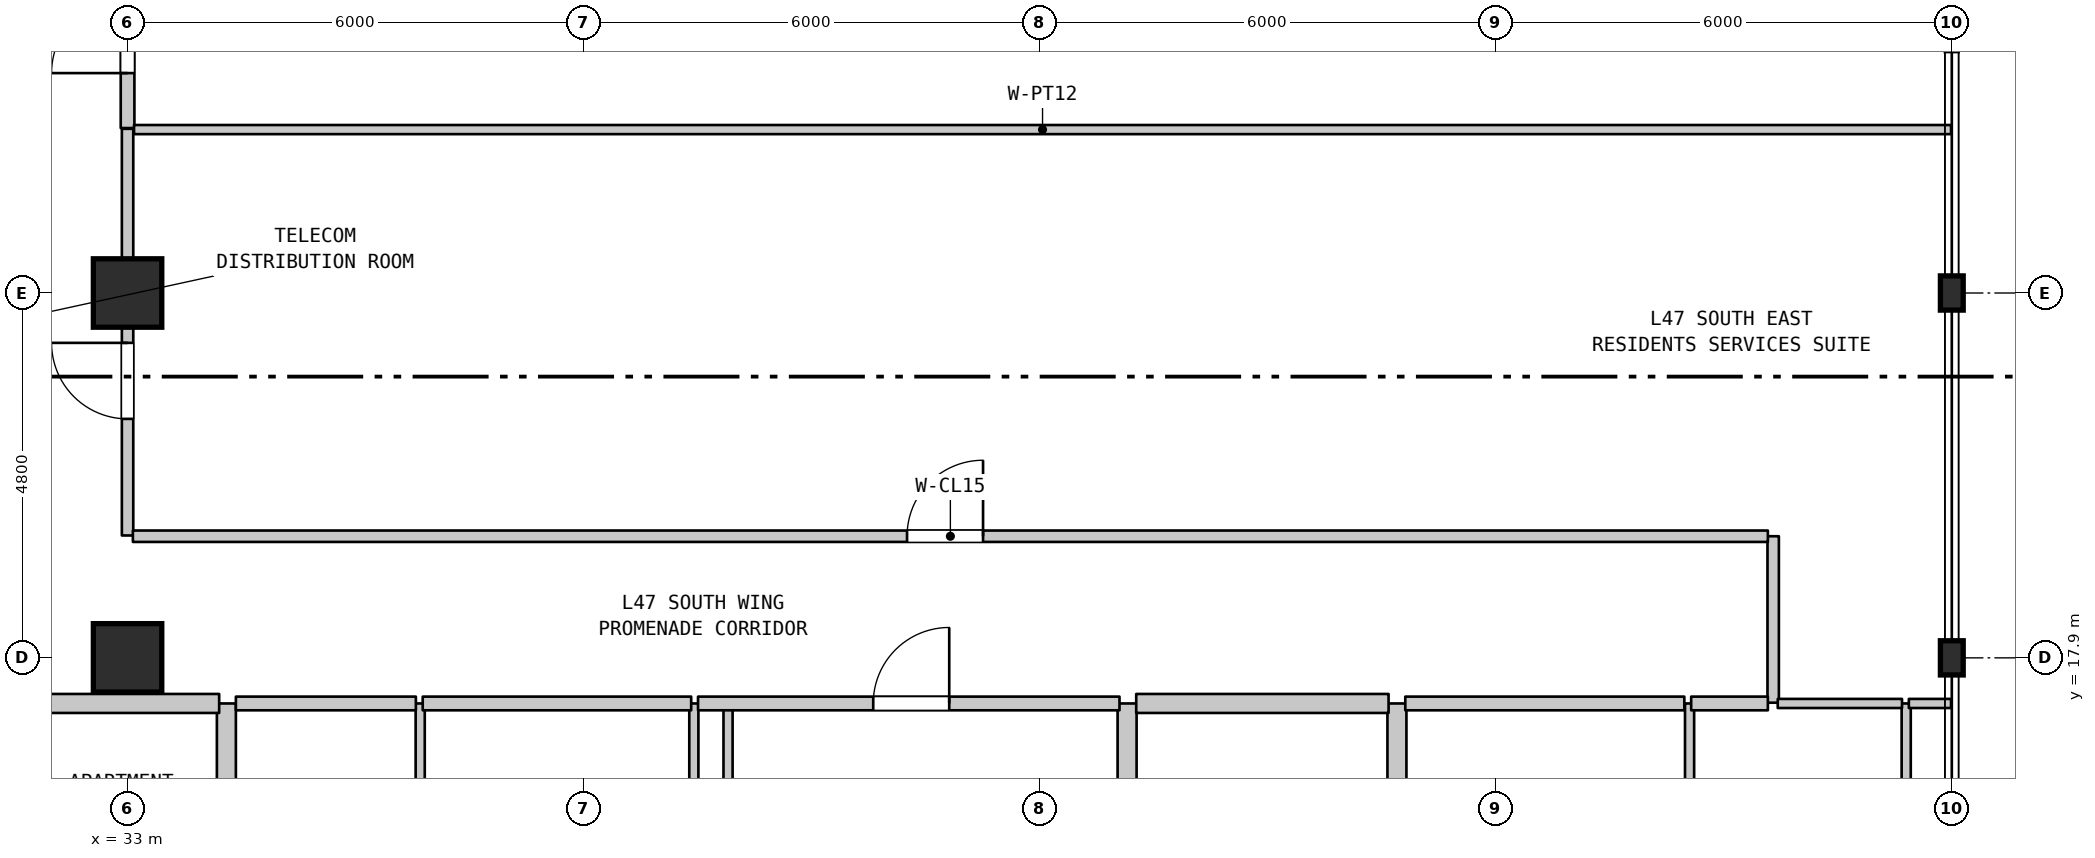
"""IFC4 building model, lengths in metres.
Left out: names, types, materials, properties, quantities, classifications, styles, units other than length and angle.
Written with IfcOpenShell. Run it as: python <this file> out.ifc"""

import sys

from ifc_helpers import new_model, si_unit, direction, frame, frame_2d, origin, origin_2d, place, context, subcontext, project, spatial, rectangle, i_section, extrude, element, fill, save


model = new_model("IFC4")
c1 = context("Model", 3, precision=1e-05, world=origin(), true_north=direction((0.0, 1.0)))
c2 = subcontext(c1, "Body", "Model", "MODEL_VIEW")
j1 = project(units=[si_unit("LENGTHUNIT", "METRE"), si_unit("PLANEANGLEUNIT", "RADIAN")], contexts=[c1])
p1 = place(None, origin())
s1 = spatial("IfcSite", under=j1, at=p1, CompositionType="ELEMENT")
p2 = place(p1, origin())
s2 = spatial("IfcBuilding", under=s1, at=p2, CompositionType="ELEMENT")
p3 = place(p2, frame((0.0, 0.0, 192.1)))
s3 = spatial("IfcBuildingStorey", under=s2, at=p3, CompositionType="ELEMENT", Elevation=192.1)
for number, where, z_axis, x_axis in (
    (1, (33.0, 17.9, 0.0), (0.0, 0.0, 1.0), (1.0, 0.0, 0.0)),
    (2, (33.0, 22.7, 0.0), (0.0, 0.0, 1.0), (1.0, 0.0, 0.0)),
):
    element("IfcColumn", number, at=place(p3, frame(where, z_axis=z_axis, x_axis=x_axis)), inside=s3, PredefinedType="COLUMN", context=c2, shape_type="SweptSolid", body=[
        extrude(rectangle(XDim=0.9, YDim=0.9, at=origin_2d()), origin(), (0.0, 0.0, 1.0), 3.7),
    ])
for number, where, z_axis, x_axis in (
    (3, (57.0, 17.9, 0.0), (0.0, 0.0, 1.0), (1.0, 0.0, 0.0)),
    (4, (57.0, 22.7, 0.0), (0.0, 0.0, 1.0), (1.0, 0.0, 0.0)),
):
    element("IfcColumn", number, at=place(p3, frame(where, z_axis=z_axis, x_axis=x_axis)), inside=s3, PredefinedType="COLUMN", context=c2, shape_type="SweptSolid", body=[
        extrude(i_section(OverallWidth=0.3, OverallDepth=0.45, WebThickness=0.014, FlangeThickness=0.026, FilletRadius=0.027, at=origin_2d()), origin(), (0.0, 0.0, 1.0), 3.7),
    ])
p4 = place(p3, frame((33.0, 19.51, 0.0), z_axis=(0.0, 0.0, 1.0), x_axis=(0.0, 1.0, 0.0)))
e5 = element("IfcWall", 5, at=p4, inside=s3, PredefinedType="STANDARD", context=c2, shape_type="SweptSolid", body=[
    extrude(rectangle(XDim=5.35, YDim=0.15, at=frame_2d((2.675, 0.0))), origin(), (0.0, 0.0, 1.0), 2.99),
])
p5 = place(p4, frame((1.534, 0.0, 0.0)))
e6 = element("IfcOpeningElement", 6, at=p5, cuts=e5, PredefinedType="OPENING", context=c2, shape_type="SweptSolid", body=[
    extrude(rectangle(XDim=1.0, YDim=2.15, at=frame_2d((0.5, 1.075))), frame((0.0, 0.085, 0.0), z_axis=(0.0, -1.0, 0.0), x_axis=(1.0, 0.0, 0.0)), (0.0, 0.0, 1.0), 0.17),
])
p6 = place(p3, frame((33.0, 24.87, 0.0), z_axis=(0.0, 0.0, 1.0), x_axis=(0.0, 1.0, 0.0)))
e7 = element("IfcWall", 7, at=p6, inside=s3, PredefinedType="STANDARD", context=c2, shape_type="SweptSolid", body=[
    extrude(rectangle(XDim=2.6, YDim=0.18, at=frame_2d((1.3, 0.0))), origin(), (0.0, 0.0, 1.0), 2.99),
])
p7 = place(p6, frame((0.723, 0.0, 0.0)))
e8 = element("IfcOpeningElement", 8, at=p7, cuts=e7, PredefinedType="OPENING", context=c2, shape_type="SweptSolid", body=[
    extrude(rectangle(XDim=1.0, YDim=2.15, at=frame_2d((0.5, 1.075))), frame((0.0, 0.1, 0.0), z_axis=(0.0, -1.0, 0.0), x_axis=(1.0, 0.0, 0.0)), (0.0, 0.0, 1.0), 0.2),
])
p8 = place(p3, frame((34.3, 11.15, 0.0), z_axis=(0.0, 0.0, 1.0), x_axis=(0.0, 1.0, 0.0)))
e9 = element("IfcWall", 9, at=p8, inside=s3, PredefinedType="STANDARD", context=c2, shape_type="SweptSolid", body=[
    extrude(rectangle(XDim=6.15, YDim=0.25, at=frame_2d((3.075, 0.0))), origin(), (0.0, 0.0, 1.0), 3.39),
])
for number, where, z_axis, x_axis in (
    (10, (36.85, 11.15, 0.0), (0.0, 0.0, 1.0), (0.0, 1.0, 0.0)),
    (11, (40.45, 11.15, 0.0), (0.0, 0.0, 1.0), (0.0, 1.0, 0.0)),
):
    element("IfcWall", number, at=place(p3, frame(where, z_axis=z_axis, x_axis=x_axis)), inside=s3, PredefinedType="PARTITIONING", context=c2, shape_type="SweptSolid", body=[
        extrude(rectangle(XDim=6.15, YDim=0.12, at=frame_2d((3.075, 0.0))), origin(), (0.0, 0.0, 1.0), 3.39),
    ])
p9 = place(p3, frame((40.9, 14.85, 0.0), z_axis=(0.0, 0.0, 1.0), x_axis=(0.0, 1.0, 0.0)))
e12 = element("IfcWall", 12, at=p9, inside=s3, PredefinedType="PARTITIONING", context=c2, shape_type="SweptSolid", body=[
    extrude(rectangle(XDim=2.45, YDim=0.12, at=frame_2d((1.225, 0.0))), origin(), (0.0, 0.0, 1.0), 3.39),
])
for number, where, z_axis, x_axis in (
    (13, (46.15, 11.15, 0.0), (0.0, 0.0, 1.0), (0.0, 1.0, 0.0)),
    (14, (49.7, 11.15, 0.0), (0.0, 0.0, 1.0), (0.0, 1.0, 0.0)),
):
    element("IfcWall", number, at=place(p3, frame(where, z_axis=z_axis, x_axis=x_axis)), inside=s3, PredefinedType="STANDARD", context=c2, shape_type="SweptSolid", body=[
        extrude(rectangle(XDim=6.15, YDim=0.25, at=frame_2d((3.075, 0.0))), origin(), (0.0, 0.0, 1.0), 3.39),
    ])
p10 = place(p3, frame((53.55, 11.15, 0.0), z_axis=(0.0, 0.0, 1.0), x_axis=(0.0, 1.0, 0.0)))
e15 = element("IfcWall", 15, at=p10, inside=s3, PredefinedType="PARTITIONING", context=c2, shape_type="SweptSolid", body=[
    extrude(rectangle(XDim=6.15, YDim=0.12, at=frame_2d((3.075, 0.0))), origin(), (0.0, 0.0, 1.0), 3.39),
])
p11 = place(p3, frame((54.65, 17.31, 0.0), z_axis=(0.0, 0.0, 1.0), x_axis=(0.0, 1.0, 0.0)))
e16 = element("IfcWall", 16, at=p11, inside=s3, PredefinedType="STANDARD", context=c2, shape_type="SweptSolid", body=[
    extrude(rectangle(XDim=2.19, YDim=0.15, at=frame_2d((1.095, 0.0))), origin(), (0.0, 0.0, 1.0), 3.39),
])
p12 = place(p3, frame((56.4, 11.15, 0.0), z_axis=(0.0, 0.0, 1.0), x_axis=(0.0, 1.0, 0.0)))
e17 = element("IfcWall", 17, at=p12, inside=s3, PredefinedType="PARTITIONING", context=c2, shape_type="SweptSolid", body=[
    extrude(rectangle(XDim=6.15, YDim=0.12, at=frame_2d((3.075, 0.0))), origin(), (0.0, 0.0, 1.0), 3.39),
])
p13 = place(p3, frame((31.56, 17.3, 0.0), z_axis=(0.0, 0.0, 1.0), x_axis=(1.0, 0.0, 0.0)))
e18 = element("IfcWall", 18, at=p13, inside=s3, PredefinedType="STANDARD", context=c2, shape_type="SweptSolid", body=[
    extrude(rectangle(XDim=2.645, YDim=0.25, at=frame_2d((1.323, 0.0))), origin(), (0.0, 0.0, 1.0), 3.39),
])
p14 = place(p3, frame((34.425, 17.3, 0.0), z_axis=(0.0, 0.0, 1.0), x_axis=(1.0, 0.0, 0.0)))
e19 = element("IfcWall", 19, at=p14, inside=s3, PredefinedType="STANDARD", context=c2, shape_type="SweptSolid", body=[
    extrude(rectangle(XDim=2.368, YDim=0.18, at=frame_2d((1.184, 0.0))), origin(), (0.0, 0.0, 1.0), 3.39),
])
p15 = place(p3, frame((36.883, 17.3, 0.0), z_axis=(0.0, 0.0, 1.0), x_axis=(1.0, 0.0, 0.0)))
e20 = element("IfcWall", 20, at=p15, inside=s3, PredefinedType="STANDARD", context=c2, shape_type="SweptSolid", body=[
    extrude(rectangle(XDim=3.532, YDim=0.18, at=frame_2d((1.766, 0.0))), origin(), (0.0, 0.0, 1.0), 3.39),
])
p16 = place(p3, frame((40.505, 17.3, 0.0), z_axis=(0.0, 0.0, 1.0), x_axis=(1.0, 0.0, 0.0)))
e21 = element("IfcWall", 21, at=p16, inside=s3, PredefinedType="STANDARD", context=c2, shape_type="SweptSolid", body=[
    extrude(rectangle(XDim=5.545, YDim=0.18, at=frame_2d((2.772, 0.0))), origin(), (0.0, 0.0, 1.0), 3.39),
])
p17 = place(p16, frame((2.305, 0.0, 0.0)))
e22 = element("IfcOpeningElement", 22, at=p17, cuts=e21, PredefinedType="OPENING", context=c2, shape_type="SweptSolid", body=[
    extrude(rectangle(XDim=1.0, YDim=2.15, at=frame_2d((0.5, 1.075))), frame((0.0, 0.1, 0.0), z_axis=(0.0, -1.0, 0.0), x_axis=(1.0, 0.0, 0.0)), (0.0, 0.0, 1.0), 0.2),
])
p18 = place(p3, frame((46.27, 17.3, 0.0), z_axis=(0.0, 0.0, 1.0), x_axis=(1.0, 0.0, 0.0)))
e23 = element("IfcWall", 23, at=p18, inside=s3, PredefinedType="STANDARD", context=c2, shape_type="SweptSolid", body=[
    extrude(rectangle(XDim=3.32, YDim=0.25, at=frame_2d((1.66, 0.0))), origin(), (0.0, 0.0, 1.0), 3.39),
])
p19 = place(p3, frame((49.81, 17.3, 0.0), z_axis=(0.0, 0.0, 1.0), x_axis=(1.0, 0.0, 0.0)))
e24 = element("IfcWall", 24, at=p19, inside=s3, PredefinedType="STANDARD", context=c2, shape_type="SweptSolid", body=[
    extrude(rectangle(XDim=3.671, YDim=0.18, at=frame_2d((1.835, 0.0))), origin(), (0.0, 0.0, 1.0), 3.39),
])
p20 = place(p3, frame((53.571, 17.3, 0.0), z_axis=(0.0, 0.0, 1.0), x_axis=(1.0, 0.0, 0.0)))
e25 = element("IfcWall", 25, at=p20, inside=s3, PredefinedType="STANDARD", context=c2, shape_type="SweptSolid", body=[
    extrude(rectangle(XDim=1.009, YDim=0.18, at=frame_2d((0.504, 0.0))), origin(), (0.0, 0.0, 1.0), 3.39),
])
p21 = place(p3, frame((54.71, 17.3, 0.0), z_axis=(0.0, 0.0, 1.0), x_axis=(1.0, 0.0, 0.0)))
e26 = element("IfcWall", 26, at=p21, inside=s3, PredefinedType="PARTITIONING", context=c2, shape_type="SweptSolid", body=[
    extrude(rectangle(XDim=1.635, YDim=0.12, at=frame_2d((0.817, 0.0))), origin(), (0.0, 0.0, 1.0), 3.39),
])
p22 = place(p3, frame((56.435, 17.3, 0.0), z_axis=(0.0, 0.0, 1.0), x_axis=(1.0, 0.0, 0.0)))
e27 = element("IfcWall", 27, at=p22, inside=s3, PredefinedType="PARTITIONING", context=c2, shape_type="SweptSolid", body=[
    extrude(rectangle(XDim=0.555, YDim=0.12, at=frame_2d((0.277, 0.0))), origin(), (0.0, 0.0, 1.0), 3.39),
])
p23 = place(p3, frame((33.07, 19.5, 0.0), z_axis=(0.0, 0.0, 1.0), x_axis=(1.0, 0.0, 0.0)))
e28 = element("IfcWall", 28, at=p23, inside=s3, PredefinedType="STANDARD", context=c2, shape_type="SweptSolid", body=[
    extrude(rectangle(XDim=21.51, YDim=0.15, at=frame_2d((10.755, 0.0))), origin(), (0.0, 0.0, 1.0), 3.39),
])
p24 = place(p23, frame((10.185, 0.0, 0.0)))
e29 = element("IfcOpeningElement", 29, at=p24, cuts=e28, PredefinedType="OPENING", context=c2, shape_type="SweptSolid", body=[
    extrude(rectangle(XDim=1.0, YDim=2.15, at=frame_2d((0.5, 1.075))), frame((0.0, 0.085, 0.0), z_axis=(0.0, -1.0, 0.0), x_axis=(1.0, 0.0, 0.0)), (0.0, 0.0, 1.0), 0.17),
])
p25 = place(p3, frame((33.085, 24.85, 0.0), z_axis=(0.0, 0.0, 1.0), x_axis=(1.0, 0.0, 0.0)))
e30 = element("IfcWall", 30, at=p25, inside=s3, PredefinedType="PARTITIONING", context=c2, shape_type="SweptSolid", body=[
    extrude(rectangle(XDim=23.905, YDim=0.12, at=frame_2d((11.953, 0.0))), origin(), (0.0, 0.0, 1.0), 3.39),
])
p26 = place(p5, origin())
e31 = element("IfcDoor", 31, at=p26, inside=s3, OperationType="SINGLE_SWING_RIGHT", PredefinedType="DOOR", context=c2, shape_type="SweptSolid", body=[
    extrude(rectangle(XDim=1.0, YDim=2.15, at=frame_2d((0.5, 1.075))), frame((0.0, 0.025, 0.0), z_axis=(0.0, -1.0, 0.0), x_axis=(1.0, 0.0, 0.0)), (0.0, 0.0, 1.0), 0.05),
])
fill(e6, e31)
p27 = place(p7, origin())
e32 = element("IfcDoor", 32, at=p27, inside=s3, OperationType="SINGLE_SWING_LEFT", PredefinedType="DOOR", context=c2, shape_type="SweptSolid", body=[
    extrude(rectangle(XDim=1.0, YDim=2.15, at=frame_2d((0.5, 1.075))), frame((0.0, 0.025, 0.0), z_axis=(0.0, -1.0, 0.0), x_axis=(1.0, 0.0, 0.0)), (0.0, 0.0, 1.0), 0.05),
])
fill(e8, e32)
p28 = place(p17, origin())
e33 = element("IfcDoor", 33, at=p28, inside=s3, OperationType="SINGLE_SWING_RIGHT", PredefinedType="DOOR", context=c2, shape_type="SweptSolid", body=[
    extrude(rectangle(XDim=1.0, YDim=2.15, at=frame_2d((0.5, 1.075))), frame((0.0, 0.025, 0.0), z_axis=(0.0, -1.0, 0.0), x_axis=(1.0, 0.0, 0.0)), (0.0, 0.0, 1.0), 0.05),
])
fill(e22, e33)
p29 = place(p24, origin())
e34 = element("IfcDoor", 34, at=p29, inside=s3, OperationType="SINGLE_SWING_RIGHT", PredefinedType="DOOR", context=c2, shape_type="SweptSolid", body=[
    extrude(rectangle(XDim=1.0, YDim=2.15, at=frame_2d((0.5, 1.075))), frame((0.0, 0.025, 0.0), z_axis=(0.0, -1.0, 0.0), x_axis=(1.0, 0.0, 0.0)), (0.0, 0.0, 1.0), 0.05),
])
fill(e29, e34)
save(model, sys.argv[1])
